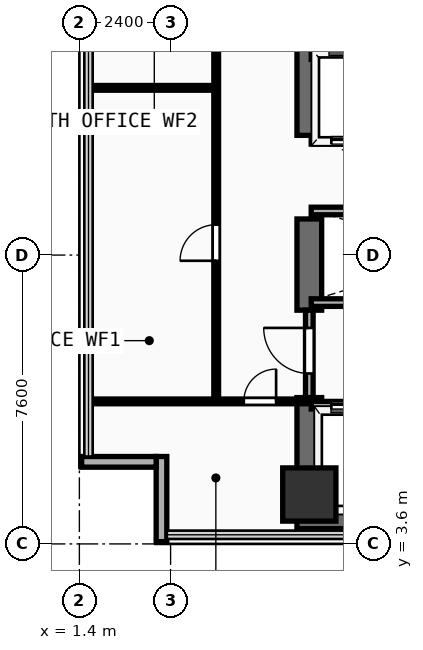
"""IFC4 building model, lengths in metres.
Left out: names, types, materials, properties, quantities, classifications, styles, units other than length and angle.
Written with IfcOpenShell. Run it as: python <this file> out.ifc"""

import sys

from ifc_helpers import new_model, si_unit, direction, frame, frame_2d, origin, origin_2d, place, context, subcontext, project, spatial, rectangle, extrude, element, fill, save


model = new_model("IFC4")
c1 = context("Model", 3, precision=1e-05, world=origin(), true_north=direction((0.0, 1.0)))
c2 = subcontext(c1, "Body", "Model", "MODEL_VIEW")
j1 = project(units=[si_unit("LENGTHUNIT", "METRE"), si_unit("PLANEANGLEUNIT", "RADIAN")], contexts=[c1])
p1 = place(None, origin())
s1 = spatial("IfcSite", under=j1, at=p1, CompositionType="ELEMENT")
p2 = place(p1, origin())
s2 = spatial("IfcBuilding", under=s1, at=p2, CompositionType="ELEMENT")
p3 = place(p2, frame((0.0, 0.0, 114.5)))
s3 = spatial("IfcBuildingStorey", under=s2, at=p3, CompositionType="ELEMENT", Elevation=114.5)
p4 = place(p3, frame((7.125, 4.325, 0.0), z_axis=(0.0, 0.0, 1.0), x_axis=(1.0, 0.0, 0.0)))
e1 = element("IfcWall", 1, at=p4, inside=s3, PredefinedType="SHEAR", context=c2, shape_type="SweptSolid", body=[
    extrude(rectangle(XDim=14.0, YDim=0.65, at=frame_2d((7.0, 0.0))), origin(), (0.0, 0.0, 1.0), 3.54),
])
p5 = place(p3, frame((7.45, 4.65, 0.0), z_axis=(0.0, 0.0, 1.0), x_axis=(0.0, 1.0, 0.0)))
e2 = element("IfcWall", 2, at=p5, inside=s3, PredefinedType="SHEAR", context=c2, shape_type="SweptSolid", body=[
    extrude(rectangle(XDim=2.8, YDim=0.65, at=frame_2d((1.4, 0.0))), origin(), (0.0, 0.0, 1.0), 3.54),
])
p6 = place(p3, frame((7.45, 9.75, 0.0), z_axis=(0.0, 0.0, 1.0), x_axis=(0.0, 1.0, 0.0)))
e3 = element("IfcWall", 3, at=p6, inside=s3, PredefinedType="SHEAR", context=c2, shape_type="SweptSolid", body=[
    extrude(rectangle(XDim=2.4, YDim=0.65, at=frame_2d((1.2, 0.0))), origin(), (0.0, 0.0, 1.0), 3.54),
])
p7 = place(p3, frame((7.45, 14.35, 0.0), z_axis=(0.0, 0.0, 1.0), x_axis=(0.0, 1.0, 0.0)))
e4 = element("IfcWall", 4, at=p7, inside=s3, PredefinedType="SHEAR", context=c2, shape_type="SweptSolid", body=[
    extrude(rectangle(XDim=4.81, YDim=0.65, at=frame_2d((2.405, 0.0))), origin(), (0.0, 0.0, 1.0), 3.54),
])
p8 = place(p3, frame((7.45, 4.9, 0.0), z_axis=(0.0, 0.0, 1.0), x_axis=(1.0, 0.0, 0.0)))
e5 = element("IfcColumn", 5, at=p8, inside=s3, PredefinedType="COLUMN", context=c2, shape_type="SweptSolid", body=[
    extrude(rectangle(XDim=1.4, YDim=1.4, at=origin_2d()), origin(), (0.0, 0.0, 1.0), 3.54),
])
p9 = place(p3, frame((3.56, 3.66, 0.0), z_axis=(0.0, 0.0, 1.0), x_axis=(0.0, 1.0, 0.0)))
e6 = element("IfcWall", 6, at=p9, inside=s3, PredefinedType="SOLIDWALL", context=c2, shape_type="SweptSolid", body=[
    extrude(rectangle(XDim=2.24, YDim=0.28, at=frame_2d((1.12, 0.0))), origin(), (0.0, 0.0, 1.0), 3.54),
])
p10 = place(p3, frame((1.46, 5.76, 0.0), z_axis=(0.0, 0.0, 1.0), x_axis=(1.0, 0.0, 0.0)))
e7 = element("IfcWall", 7, at=p10, inside=s3, PredefinedType="SOLIDWALL", context=c2, shape_type="SweptSolid", body=[
    extrude(rectangle(XDim=1.96, YDim=0.28, at=frame_2d((0.98, 0.0))), origin(), (0.0, 0.0, 1.0), 3.54),
])
p11 = place(p3, frame((7.5, 7.25, 0.0), z_axis=(0.0, 0.0, 1.0), x_axis=(1.0, 0.0, 0.0)))
e8 = element("IfcWall", 8, at=p11, inside=s3, PredefinedType="PARTITIONING", context=c2, shape_type="SweptSolid", body=[
    extrude(rectangle(XDim=8.35, YDim=0.2, at=frame_2d((4.175, 0.0))), origin(), (0.0, 0.0, 1.0), 3.54),
])
p12 = place(p11, frame((0.53, 0.0, 0.0)))
e9 = element("IfcOpeningElement", 9, at=p12, cuts=e8, PredefinedType="OPENING", context=c2, shape_type="SweptSolid", body=[
    extrude(rectangle(XDim=1.1, YDim=2.2, at=frame_2d((0.55, 1.1))), frame((0.0, 0.11, 0.0), z_axis=(0.0, -1.0, 0.0), x_axis=(1.0, 0.0, 0.0)), (0.0, 0.0, 1.0), 0.22),
])
p13 = place(p11, frame((2.37, 0.0, 0.0)))
e10 = element("IfcOpeningElement", 10, at=p13, cuts=e8, PredefinedType="OPENING", context=c2, shape_type="SweptSolid", body=[
    extrude(rectangle(XDim=1.1, YDim=2.2, at=frame_2d((0.55, 1.1))), frame((0.0, 0.11, 0.0), z_axis=(0.0, -1.0, 0.0), x_axis=(1.0, 0.0, 0.0)), (0.0, 0.0, 1.0), 0.22),
])
p14 = place(p11, frame((4.33, 0.0, 0.0)))
e11 = element("IfcOpeningElement", 11, at=p14, cuts=e8, PredefinedType="OPENING", context=c2, shape_type="SweptSolid", body=[
    extrude(rectangle(XDim=1.1, YDim=2.2, at=frame_2d((0.55, 1.1))), frame((0.0, 0.11, 0.0), z_axis=(0.0, -1.0, 0.0), x_axis=(1.0, 0.0, 0.0)), (0.0, 0.0, 1.0), 0.22),
])
p15 = place(p11, frame((6.5, 0.0, 0.0)))
e12 = element("IfcOpeningElement", 12, at=p15, cuts=e8, PredefinedType="OPENING", context=c2, shape_type="SweptSolid", body=[
    extrude(rectangle(XDim=1.1, YDim=2.2, at=frame_2d((0.55, 1.1))), frame((0.0, 0.11, 0.0), z_axis=(0.0, -1.0, 0.0), x_axis=(1.0, 0.0, 0.0)), (0.0, 0.0, 1.0), 0.22),
])
p16 = place(p3, frame((7.5, 9.95, 0.0), z_axis=(0.0, 0.0, 1.0), x_axis=(1.0, 0.0, 0.0)))
e13 = element("IfcWall", 13, at=p16, inside=s3, PredefinedType="PARTITIONING", context=c2, shape_type="SweptSolid", body=[
    extrude(rectangle(XDim=8.35, YDim=0.2, at=frame_2d((4.175, 0.0))), origin(), (0.0, 0.0, 1.0), 3.54),
])
p17 = place(p3, frame((7.45, 7.45, 0.0), z_axis=(0.0, 0.0, 1.0), x_axis=(0.0, 1.0, 0.0)))
e14 = element("IfcWall", 14, at=p17, inside=s3, PredefinedType="PARTITIONING", context=c2, shape_type="SweptSolid", body=[
    extrude(rectangle(XDim=2.3, YDim=0.2, at=frame_2d((1.15, 0.0))), origin(), (0.0, 0.0, 1.0), 2.52),
])
p18 = place(p17, frame((0.633, 0.0, 0.0)))
e15 = element("IfcOpeningElement", 15, at=p18, cuts=e14, PredefinedType="OPENING", context=c2, shape_type="SweptSolid", body=[
    extrude(rectangle(XDim=1.2, YDim=2.25, at=frame_2d((0.6, 1.125))), frame((0.0, 0.11, 0.0), z_axis=(0.0, -1.0, 0.0), x_axis=(1.0, 0.0, 0.0)), (0.0, 0.0, 1.0), 0.22),
])
p19 = place(p3, frame((7.5, 12.36, 0.0), z_axis=(0.0, 0.0, 1.0), x_axis=(1.0, 0.0, 0.0)))
e16 = element("IfcWall", 16, at=p19, inside=s3, PredefinedType="PARTITIONING", context=c2, shape_type="SweptSolid", body=[
    extrude(rectangle(XDim=7.85, YDim=0.2, at=frame_2d((3.925, 0.0))), origin(), (0.0, 0.0, 1.0), 3.54),
])
p20 = place(p3, frame((7.5, 14.22, 0.0), z_axis=(0.0, 0.0, 1.0), x_axis=(1.0, 0.0, 0.0)))
e17 = element("IfcWall", 17, at=p20, inside=s3, PredefinedType="PARTITIONING", context=c2, shape_type="SweptSolid", body=[
    extrude(rectangle(XDim=7.85, YDim=0.2, at=frame_2d((3.925, 0.0))), origin(), (0.0, 0.0, 1.0), 3.54),
])
p21 = place(p20, frame((0.53, 0.0, 0.0)))
e18 = element("IfcOpeningElement", 18, at=p21, cuts=e17, PredefinedType="OPENING", context=c2, shape_type="SweptSolid", body=[
    extrude(rectangle(XDim=1.1, YDim=2.2, at=frame_2d((0.55, 1.1))), frame((0.0, 0.11, 0.0), z_axis=(0.0, -1.0, 0.0), x_axis=(1.0, 0.0, 0.0)), (0.0, 0.0, 1.0), 0.22),
])
p22 = place(p20, frame((2.42, 0.0, 0.0)))
e19 = element("IfcOpeningElement", 19, at=p22, cuts=e17, PredefinedType="OPENING", context=c2, shape_type="SweptSolid", body=[
    extrude(rectangle(XDim=1.1, YDim=2.2, at=frame_2d((0.55, 1.1))), frame((0.0, 0.11, 0.0), z_axis=(0.0, -1.0, 0.0), x_axis=(1.0, 0.0, 0.0)), (0.0, 0.0, 1.0), 0.22),
])
p23 = place(p20, frame((4.31, 0.0, 0.0)))
e20 = element("IfcOpeningElement", 20, at=p23, cuts=e17, PredefinedType="OPENING", context=c2, shape_type="SweptSolid", body=[
    extrude(rectangle(XDim=1.1, YDim=2.2, at=frame_2d((0.55, 1.1))), frame((0.0, 0.11, 0.0), z_axis=(0.0, -1.0, 0.0), x_axis=(1.0, 0.0, 0.0)), (0.0, 0.0, 1.0), 0.22),
])
p24 = place(p20, frame((6.2, 0.0, 0.0)))
e21 = element("IfcOpeningElement", 21, at=p24, cuts=e17, PredefinedType="OPENING", context=c2, shape_type="SweptSolid", body=[
    extrude(rectangle(XDim=1.1, YDim=2.2, at=frame_2d((0.55, 1.1))), frame((0.0, 0.11, 0.0), z_axis=(0.0, -1.0, 0.0), x_axis=(1.0, 0.0, 0.0)), (0.0, 0.0, 1.0), 0.22),
])
p25 = place(p3, frame((7.5, 16.45, 0.0), z_axis=(0.0, 0.0, 1.0), x_axis=(1.0, 0.0, 0.0)))
e22 = element("IfcWall", 22, at=p25, inside=s3, PredefinedType="PARTITIONING", context=c2, shape_type="SweptSolid", body=[
    extrude(rectangle(XDim=7.85, YDim=0.2, at=frame_2d((3.925, 0.0))), origin(), (0.0, 0.0, 1.0), 3.54),
])
p26 = place(p3, frame((1.64, 7.35, 0.0), z_axis=(0.0, 0.0, 1.0), x_axis=(1.0, 0.0, 0.0)))
e23 = element("IfcWall", 23, at=p26, inside=s3, PredefinedType="PARTITIONING", context=c2, shape_type="SweptSolid", body=[
    extrude(rectangle(XDim=5.76, YDim=0.125, at=frame_2d((2.88, 0.0))), origin(), (0.0, 0.0, 1.0), 3.54),
])
p27 = place(p26, frame((4.087, 0.0, 0.0)))
e24 = element("IfcOpeningElement", 24, at=p27, cuts=e23, PredefinedType="OPENING", context=c2, shape_type="SweptSolid", body=[
    extrude(rectangle(XDim=0.85, YDim=2.15, at=frame_2d((0.425, 1.075))), frame((0.0, 0.073, 0.0), z_axis=(0.0, -1.0, 0.0), x_axis=(1.0, 0.0, 0.0)), (0.0, 0.0, 1.0), 0.145),
])
p28 = place(p3, frame((5.0, 7.5, 0.0), z_axis=(0.0, 0.0, 1.0), x_axis=(0.0, 1.0, 0.0)))
e25 = element("IfcWall", 25, at=p28, inside=s3, PredefinedType="PARTITIONING", context=c2, shape_type="SweptSolid", body=[
    extrude(rectangle(XDim=17.75, YDim=0.125, at=frame_2d((8.875, 0.0))), origin(), (0.0, 0.0, 1.0), 3.54),
])
p29 = place(p28, frame((3.55, 0.0, 0.0)))
e26 = element("IfcOpeningElement", 26, at=p29, cuts=e25, PredefinedType="OPENING", context=c2, shape_type="SweptSolid", body=[
    extrude(rectangle(XDim=0.95, YDim=2.15, at=frame_2d((0.475, 1.075))), frame((0.0, 0.073, 0.0), z_axis=(0.0, -1.0, 0.0), x_axis=(1.0, 0.0, 0.0)), (0.0, 0.0, 1.0), 0.145),
])
p30 = place(p28, frame((12.521, 0.0, 0.0)))
e27 = element("IfcOpeningElement", 27, at=p30, cuts=e25, PredefinedType="OPENING", context=c2, shape_type="SweptSolid", body=[
    extrude(rectangle(XDim=0.95, YDim=2.15, at=frame_2d((0.475, 1.075))), frame((0.0, 0.073, 0.0), z_axis=(0.0, -1.0, 0.0), x_axis=(1.0, 0.0, 0.0)), (0.0, 0.0, 1.0), 0.145),
])
p31 = place(p3, frame((1.64, 15.6, 0.0), z_axis=(0.0, 0.0, 1.0), x_axis=(1.0, 0.0, 0.0)))
e28 = element("IfcWall", 28, at=p31, inside=s3, PredefinedType="PARTITIONING", context=c2, shape_type="SweptSolid", body=[
    extrude(rectangle(XDim=3.36, YDim=0.125, at=frame_2d((1.68, 0.0))), origin(), (0.0, 0.0, 1.0), 3.54),
])
p32 = place(p12, origin())
e29 = element("IfcDoor", 29, at=p32, inside=s3, OperationType="SLIDING_TO_LEFT", PredefinedType="DOOR", context=c2, shape_type="SweptSolid", body=[
    extrude(rectangle(XDim=1.1, YDim=2.2, at=frame_2d((0.55, 1.1))), frame((0.0, 0.025, 0.0), z_axis=(0.0, -1.0, 0.0), x_axis=(1.0, 0.0, 0.0)), (0.0, 0.0, 1.0), 0.05),
])
fill(e9, e29)
p33 = place(p18, frame((1.2, 0.0, 0.0), z_axis=(0.0, 0.0, 1.0), x_axis=(-1.0, 0.0, 0.0)))
e30 = element("IfcDoor", 30, at=p33, inside=s3, OperationType="SINGLE_SWING_LEFT", PredefinedType="DOOR", context=c2, shape_type="SweptSolid", body=[
    extrude(rectangle(XDim=1.2, YDim=2.25, at=frame_2d((0.6, 1.125))), frame((0.0, 0.025, 0.0), z_axis=(0.0, -1.0, 0.0), x_axis=(1.0, 0.0, 0.0)), (0.0, 0.0, 1.0), 0.05),
])
fill(e15, e30)
p34 = place(p21, frame((1.1, 0.0, 0.0), z_axis=(0.0, 0.0, 1.0), x_axis=(-1.0, 0.0, 0.0)))
e31 = element("IfcDoor", 31, at=p34, inside=s3, OperationType="SLIDING_TO_LEFT", PredefinedType="DOOR", context=c2, shape_type="SweptSolid", body=[
    extrude(rectangle(XDim=1.1, YDim=2.2, at=frame_2d((0.55, 1.1))), frame((0.0, 0.025, 0.0), z_axis=(0.0, -1.0, 0.0), x_axis=(1.0, 0.0, 0.0)), (0.0, 0.0, 1.0), 0.05),
])
fill(e18, e31)
p35 = place(p27, origin())
e32 = element("IfcDoor", 32, at=p35, inside=s3, OperationType="SINGLE_SWING_RIGHT", PredefinedType="DOOR", context=c2, shape_type="SweptSolid", body=[
    extrude(rectangle(XDim=0.85, YDim=2.15, at=frame_2d((0.425, 1.075))), frame((0.0, 0.025, 0.0), z_axis=(0.0, -1.0, 0.0), x_axis=(1.0, 0.0, 0.0)), (0.0, 0.0, 1.0), 0.05),
])
fill(e24, e32)
p36 = place(p29, origin())
e33 = element("IfcDoor", 33, at=p36, inside=s3, OperationType="SINGLE_SWING_LEFT", PredefinedType="DOOR", context=c2, shape_type="SweptSolid", body=[
    extrude(rectangle(XDim=0.95, YDim=2.15, at=frame_2d((0.475, 1.075))), frame((0.0, 0.025, 0.0), z_axis=(0.0, -1.0, 0.0), x_axis=(1.0, 0.0, 0.0)), (0.0, 0.0, 1.0), 0.05),
])
fill(e26, e33)
save(model, sys.argv[1])
